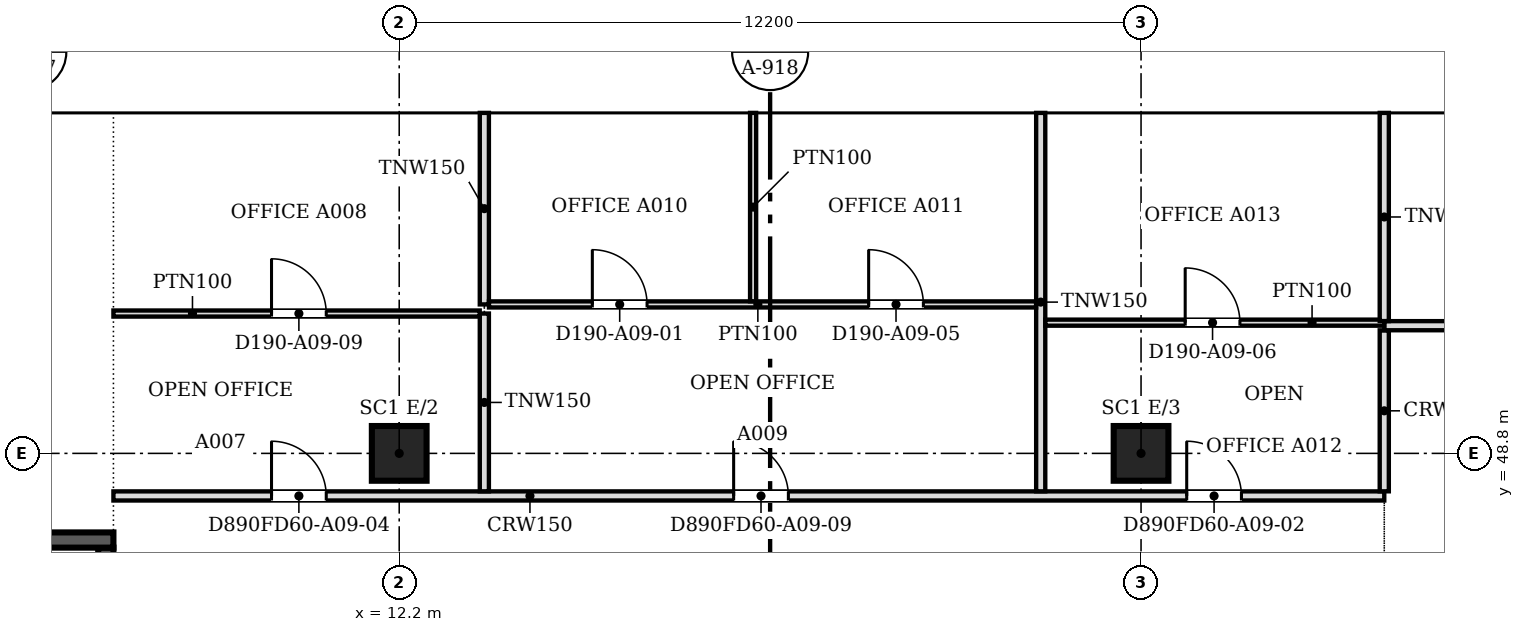
"""IFC4 building model, lengths in metres.
Left out: names, types, materials, properties, quantities, classifications, styles, units other than length and angle.
Written with IfcOpenShell. Run it as: python <this file> out.ifc"""

import sys

from ifc_helpers import new_model, si_unit, direction, frame, frame_2d, origin, origin_2d, place, context, subcontext, project, spatial, polyline, rectangle, outline, extrude, faceted_brep, source, transform, mapped, element, fill, save


model = new_model("IFC4")
c1 = context("Model", 3, precision=1e-05, world=origin(), true_north=direction((0.0, 1.0)))
c2 = subcontext(c1, "Body", "Model", "MODEL_VIEW")
j1 = project(units=[si_unit("LENGTHUNIT", "METRE"), si_unit("PLANEANGLEUNIT", "RADIAN")], contexts=[c1])
p1 = place(None, origin())
s1 = spatial("IfcSite", under=j1, at=p1, CompositionType="ELEMENT")
p2 = place(p1, origin())
s2 = spatial("IfcBuilding", under=s1, at=p2, CompositionType="ELEMENT")
p3 = place(p2, frame((0.0, 0.0, 102.8)))
s3 = spatial("IfcBuildingStorey", under=s2, at=p3, CompositionType="ELEMENT", Elevation=102.8)
for number, where, z_axis, x_axis in (
    (1, (12.2, 48.8, 0.0), (0.0, 0.0, 1.0), (1.0, 0.0, 0.0)),
    (2, (24.4, 48.8, 0.0), (0.0, 0.0, 1.0), (1.0, 0.0, 0.0)),
):
    element("IfcColumn", number, at=place(p3, frame(where, z_axis=z_axis, x_axis=x_axis)), inside=s3, PredefinedType="COLUMN", context=c2, shape_type="SweptSolid", body=[
        extrude(rectangle(XDim=0.9, YDim=0.9, at=origin_2d()), origin(), (0.0, 0.0, 1.0), 3.55),
    ])
m1 = source(origin(), c2, "Body", "SweptSolid", [
    extrude(outline(polyline([(3.05, 0.0), (6.1, 3.8), (3.05, 7.6), (0.0, 3.8), (3.05, 0.0)])), frame((0.0, 0.25, 0.0), z_axis=(0.0, -1.0, 0.0), x_axis=(1.0, 0.0, 0.0)), (0.0, 0.0, 1.0), 0.5),
])
p4 = place(p3, frame((30.5, 54.65, -3.8), z_axis=(0.0, 0.0, 1.0), x_axis=(-1.0, 0.0, 0.0)))
e3 = element("IfcWall", 3, at=p4, inside=s3, PredefinedType="SOLIDWALL", context=c2, shape_type="MappedRepresentation", body=[
    mapped(m1, transform((0.0, 0.0, 0.0), scale=1.0)),
])
m2 = source(origin(), c2, "Body", "SweptSolid", [
    extrude(outline(polyline([(3.05, 0.399), (5.78, 3.8), (3.05, 7.201), (0.321, 3.8), (3.05, 0.399)])), frame((0.0, 0.26, 0.0), z_axis=(0.0, -1.0, 0.0), x_axis=(1.0, 0.0, 0.0)), (0.0, 0.0, 1.0), 0.52),
])
p5 = place(p4, origin())
e4 = element("IfcOpeningElement", 4, at=p5, cuts=e3, PredefinedType="OPENING", context=c2, shape_type="MappedRepresentation", body=[
    mapped(m2, transform((0.0, 0.0, 0.0), scale=1.0)),
])
m3 = source(origin(), c2, "Body", "Brep", [
    faceted_brep([(3.05, -0.25, 0.0), (6.1, -0.25, 3.8), (6.1, -0.25, 3.8), (3.05, -0.25, 7.6), (0.0, -0.25, 3.8), (0.0, 0.25, 3.8), (3.05, 0.25, 7.6), (6.1, 0.25, 3.8), (6.1, 0.25, 3.8), (3.05, 0.25, 0.0)], [[[0, 1, 2, 3, 4]], [[5, 6, 7, 8, 9]], [[9, 8, 1, 0]], [[7, 6, 3, 2]], [[6, 5, 4, 3]], [[5, 9, 0, 4]], [[1, 8, 7, 2]]]),
])
p6 = place(p3, frame((24.4, 54.65, -3.8), z_axis=(0.0, 0.0, 1.0), x_axis=(-1.0, 0.0, 0.0)))
e5 = element("IfcWall", 5, at=p6, inside=s3, PredefinedType="SOLIDWALL", context=c2, shape_type="MappedRepresentation", body=[
    mapped(m3, transform((0.0, 0.0, 0.0), scale=1.0)),
])
p7 = place(p6, origin())
e6 = element("IfcOpeningElement", 6, at=p7, cuts=e5, PredefinedType="OPENING", context=c2, shape_type="MappedRepresentation", body=[
    mapped(m2, transform((0.0, 0.0, 0.0), scale=1.0)),
])
p8 = place(p3, frame((18.3, 54.65, -3.8), z_axis=(0.0, 0.0, 1.0), x_axis=(-1.0, 0.0, 0.0)))
e7 = element("IfcWall", 7, at=p8, inside=s3, PredefinedType="SOLIDWALL", context=c2, shape_type="MappedRepresentation", body=[
    mapped(m1, transform((0.0, 0.0, 0.0), scale=1.0)),
])
p9 = place(p8, origin())
e8 = element("IfcOpeningElement", 8, at=p9, cuts=e7, PredefinedType="OPENING", context=c2, shape_type="MappedRepresentation", body=[
    mapped(m2, transform((0.0, 0.0, 0.0), scale=1.0)),
])
m4 = source(origin(), c2, "Body", "Brep", [
    faceted_brep([(3.05, -0.25, 0.0), (6.053, -0.25, 3.8), (3.05, -0.25, 7.6), (0.0, -0.25, 3.8), (0.0, 0.25, 3.8), (3.05, 0.25, 7.6), (6.007, 0.25, 3.859), (6.007, 0.25, 3.741), (3.05, 0.25, 0.0), (6.053, 0.0, 3.8)], [[[0, 1, 2, 3]], [[4, 5, 6, 7, 8]], [[8, 7, 9, 1, 0]], [[6, 5, 2, 1, 9]], [[5, 4, 3, 2]], [[4, 8, 0, 3]], [[9, 7, 6]]]),
])
p10 = place(p3, frame((12.2, 54.65, -3.8), z_axis=(0.0, 0.0, 1.0), x_axis=(-1.0, 0.0, 0.0)))
e9 = element("IfcWall", 9, at=p10, inside=s3, PredefinedType="SOLIDWALL", context=c2, shape_type="MappedRepresentation", body=[
    mapped(m4, transform((0.0, 0.0, 0.0), scale=1.0)),
])
m5 = source(origin(), c2, "Body", "SweptSolid", [
    extrude(outline(polyline([(3.049, 0.401), (5.735, 3.8), (3.049, 7.199), (0.321, 3.8), (3.049, 0.401)])), frame((0.0, 0.26, 0.0), z_axis=(0.0, -1.0, 0.0), x_axis=(1.0, 0.0, 0.0)), (0.0, 0.0, 1.0), 0.52),
])
p11 = place(p10, origin())
e10 = element("IfcOpeningElement", 10, at=p11, cuts=e9, PredefinedType="OPENING", context=c2, shape_type="MappedRepresentation", body=[
    mapped(m5, transform((0.0, 0.0, 0.0), scale=1.0)),
])
m6 = source(origin(), c2, "Body", "SweptSolid", [
    extrude(outline(polyline([(3.05, 0.0), (6.1, 3.8), (0.0, 3.8), (3.05, 0.0)])), frame((0.0, 0.25, 0.0), z_axis=(0.0, -1.0, 0.0), x_axis=(1.0, 0.0, 0.0)), (0.0, 0.0, 1.0), 0.5),
])
p12 = place(p3, frame((33.55, 54.65, 0.0), z_axis=(0.0, 0.0, 1.0), x_axis=(-1.0, 0.0, 0.0)))
e11 = element("IfcWall", 11, at=p12, inside=s3, PredefinedType="SOLIDWALL", context=c2, shape_type="MappedRepresentation", body=[
    mapped(m6, transform((0.0, 0.0, 0.0), scale=1.0)),
])
m7 = source(origin(), c2, "Body", "SweptSolid", [
    extrude(outline(polyline([(3.05, 0.399), (5.579, 3.55), (0.521, 3.55), (3.05, 0.399)])), frame((0.0, 0.26, 0.0), z_axis=(0.0, -1.0, 0.0), x_axis=(1.0, 0.0, 0.0)), (0.0, 0.0, 1.0), 0.52),
])
p13 = place(p12, origin())
e12 = element("IfcOpeningElement", 12, at=p13, cuts=e11, PredefinedType="OPENING", context=c2, shape_type="MappedRepresentation", body=[
    mapped(m7, transform((0.0, 0.0, 0.0), scale=1.0)),
])
m8 = source(origin(), c2, "Body", "Brep", [
    faceted_brep([(3.05, -0.25, 0.0), (6.1, -0.25, 3.8), (6.1, -0.25, 3.8), (0.0, -0.25, 3.8), (0.0, 0.25, 3.8), (6.1, 0.25, 3.8), (6.1, 0.25, 3.8), (3.05, 0.25, 0.0)], [[[0, 1, 2, 3]], [[4, 5, 6, 7]], [[7, 6, 1, 0]], [[5, 4, 3, 2]], [[4, 7, 0, 3]], [[1, 6, 5, 2]]]),
])
p14 = place(p3, frame((27.45, 54.65, 0.0), z_axis=(0.0, 0.0, 1.0), x_axis=(-1.0, 0.0, 0.0)))
e13 = element("IfcWall", 13, at=p14, inside=s3, PredefinedType="SOLIDWALL", context=c2, shape_type="MappedRepresentation", body=[
    mapped(m8, transform((0.0, 0.0, 0.0), scale=1.0)),
])
p15 = place(p14, origin())
e14 = element("IfcOpeningElement", 14, at=p15, cuts=e13, PredefinedType="OPENING", context=c2, shape_type="MappedRepresentation", body=[
    mapped(m7, transform((0.0, 0.0, 0.0), scale=1.0)),
])
p16 = place(p3, frame((21.35, 54.65, 0.0), z_axis=(0.0, 0.0, 1.0), x_axis=(-1.0, 0.0, 0.0)))
e15 = element("IfcWall", 15, at=p16, inside=s3, PredefinedType="SOLIDWALL", context=c2, shape_type="MappedRepresentation", body=[
    mapped(m6, transform((0.0, 0.0, 0.0), scale=1.0)),
])
p17 = place(p16, origin())
e16 = element("IfcOpeningElement", 16, at=p17, cuts=e15, PredefinedType="OPENING", context=c2, shape_type="MappedRepresentation", body=[
    mapped(m7, transform((0.0, 0.0, 0.0), scale=1.0)),
])
p18 = place(p3, frame((15.25, 54.65, 0.0), z_axis=(0.0, 0.0, 1.0), x_axis=(-1.0, 0.0, 0.0)))
e17 = element("IfcWall", 17, at=p18, inside=s3, PredefinedType="SOLIDWALL", context=c2, shape_type="MappedRepresentation", body=[
    mapped(m6, transform((0.0, 0.0, 0.0), scale=1.0)),
])
p19 = place(p18, origin())
e18 = element("IfcOpeningElement", 18, at=p19, cuts=e17, PredefinedType="OPENING", context=c2, shape_type="MappedRepresentation", body=[
    mapped(m7, transform((0.0, 0.0, 0.0), scale=1.0)),
])
m9 = source(origin(), c2, "Body", "Brep", [
    faceted_brep([(3.003, -0.25, 0.0), (3.05, -0.25, 0.06), (3.05, -0.25, 3.8), (0.0, -0.25, 3.8), (0.0, 0.25, 3.8), (2.957, 0.25, 3.8), (2.957, 0.25, 0.059), (3.003, 0.0, 0.0)], [[[0, 1, 2, 3]], [[4, 5, 6]], [[1, 0, 7]], [[5, 4, 3, 2]], [[4, 6, 7, 0, 3]], [[1, 7, 6, 5, 2]]]),
])
p20 = place(p3, frame((9.15, 54.65, 0.0), z_axis=(0.0, 0.0, 1.0), x_axis=(-1.0, 0.0, 0.0)))
e19 = element("IfcWall", 19, at=p20, inside=s3, PredefinedType="SOLIDWALL", context=c2, shape_type="MappedRepresentation", body=[
    mapped(m9, transform((0.0, 0.0, 0.0), scale=1.0)),
])
m10 = source(origin(), c2, "Body", "SweptSolid", [
    extrude(outline(polyline([(2.803, 3.55), (0.516, 3.55), (2.803, 0.656), (2.803, 3.55)])), frame((0.0, 0.26, 0.0), z_axis=(0.0, -1.0, 0.0), x_axis=(1.0, 0.0, 0.0)), (0.0, 0.0, 1.0), 0.52),
])
p21 = place(p20, origin())
e20 = element("IfcOpeningElement", 20, at=p21, cuts=e19, PredefinedType="OPENING", context=c2, shape_type="MappedRepresentation", body=[
    mapped(m10, transform((0.0, 0.0, 0.0), scale=1.0)),
])
p22 = place(p3, frame((3.6, 47.375, 0.0), z_axis=(0.0, 0.0, 1.0), x_axis=(1.0, 0.0, 0.0)))
e21 = element("IfcWall", 21, at=p22, inside=s3, PredefinedType="SOLIDWALL", context=c2, shape_type="SweptSolid", body=[
    extrude(rectangle(XDim=3.9, YDim=0.25, at=frame_2d((1.95, 0.0))), origin(), (0.0, 0.0, 1.0), 3.8),
])
p23 = place(p3, frame((7.375, 47.25, 0.0), z_axis=(0.0, 0.0, 1.0), x_axis=(0.0, -1.0, 0.0)))
e22 = element("IfcWall", 22, at=p23, inside=s3, PredefinedType="SOLIDWALL", context=c2, shape_type="SweptSolid", body=[
    extrude(rectangle(XDim=8.0, YDim=0.25, at=frame_2d((4.0, 0.0))), origin(), (0.0, 0.0, 1.0), 3.8),
])
m11 = source(origin(), c2, "Body", "SweptSolid", [
    extrude(rectangle(XDim=1.2, YDim=2.1, at=frame_2d((0.6, 1.05))), frame((0.0, 0.135, 0.0), z_axis=(0.0, -1.0, 0.0), x_axis=(1.0, 0.0, 0.0)), (0.0, 0.0, 1.0), 0.27),
])
p24 = place(p23, frame((0.15, 0.0, 0.0)))
e23 = element("IfcOpeningElement", 23, at=p24, cuts=e22, PredefinedType="OPENING", context=c2, shape_type="MappedRepresentation", body=[
    mapped(m11, transform((0.0, 0.0, 0.0), scale=1.0)),
])
p25 = place(p3, frame((7.5, 48.1, 0.0), z_axis=(0.0, 0.0, 1.0), x_axis=(1.0, 0.0, 0.0)))
e24 = element("IfcWall", 24, at=p25, inside=s3, PredefinedType="PARTITIONING", context=c2, shape_type="SweptSolid", body=[
    extrude(rectangle(XDim=20.9, YDim=0.15, at=frame_2d((10.45, 0.0))), origin(), (0.0, 0.0, 1.0), 2.715),
])
m12 = source(origin(), c2, "Body", "SweptSolid", [
    extrude(rectangle(XDim=0.9, YDim=2.1, at=frame_2d((0.45, 1.05))), frame((0.0, 0.085, 0.0), z_axis=(0.0, -1.0, 0.0), x_axis=(1.0, 0.0, 0.0)), (0.0, 0.0, 1.0), 0.17),
])
p26 = place(p25, frame((17.651, 0.0, 0.0)))
e25 = element("IfcOpeningElement", 25, at=p26, cuts=e24, PredefinedType="OPENING", context=c2, shape_type="MappedRepresentation", body=[
    mapped(m12, transform((0.0, 0.0, 0.0), scale=1.0)),
])
p27 = place(p25, frame((2.6, 0.0, 0.0)))
e26 = element("IfcOpeningElement", 26, at=p27, cuts=e24, PredefinedType="OPENING", context=c2, shape_type="MappedRepresentation", body=[
    mapped(m12, transform((0.0, 0.0, 0.0), scale=1.0)),
])
p28 = place(p25, frame((10.2, 0.0, 0.0)))
e27 = element("IfcOpeningElement", 27, at=p28, cuts=e24, PredefinedType="OPENING", context=c2, shape_type="MappedRepresentation", body=[
    mapped(m12, transform((0.0, 0.0, 0.0), scale=1.0)),
])
p29 = place(p3, frame((13.6, 48.176, 0.0), z_axis=(0.0, 0.0, 1.0), x_axis=(0.0, 1.0, 0.0)))
e28 = element("IfcWall", 28, at=p29, inside=s3, PredefinedType="PARTITIONING", context=c2, shape_type="SweptSolid", body=[
    extrude(rectangle(XDim=2.924, YDim=0.15, at=frame_2d((1.462, 0.0))), origin(), (0.0, 0.0, 1.0), 2.715),
])
p30 = place(p3, frame((22.75, 48.176, 0.0), z_axis=(0.0, 0.0, 1.0), x_axis=(0.0, 1.0, 0.0)))
e29 = element("IfcWall", 29, at=p30, inside=s3, PredefinedType="PARTITIONING", context=c2, shape_type="SweptSolid", body=[
    extrude(rectangle(XDim=6.224, YDim=0.15, at=frame_2d((3.112, 0.0))), origin(), (0.0, 0.0, 1.0), 2.715),
])
p31 = place(p3, frame((28.4, 48.176, 0.0), z_axis=(0.0, 0.0, 1.0), x_axis=(0.0, 1.0, 0.0)))
e30 = element("IfcWall", 30, at=p31, inside=s3, PredefinedType="PARTITIONING", context=c2, shape_type="SweptSolid", body=[
    extrude(rectangle(XDim=2.648, YDim=0.15, at=frame_2d((1.324, 0.0))), origin(), (0.0, 0.0, 1.0), 2.715),
])
p32 = place(p3, frame((28.4, 50.9, 0.0), z_axis=(0.0, 0.0, 1.0), x_axis=(1.0, 0.0, 0.0)))
e31 = element("IfcWall", 31, at=p32, inside=s3, PredefinedType="PARTITIONING", context=c2, shape_type="SweptSolid", body=[
    extrude(rectangle(XDim=31.254, YDim=0.15, at=frame_2d((15.627, 0.0))), origin(), (0.0, 0.0, 1.0), 2.715),
])
p33 = place(p32, frame((4.1, 0.0, 0.0)))
e32 = element("IfcOpeningElement", 32, at=p33, cuts=e31, PredefinedType="OPENING", context=c2, shape_type="MappedRepresentation", body=[
    mapped(m12, transform((0.0, 0.0, 0.0), scale=1.0)),
])
p34 = place(p32, frame((13.25, 0.0, 0.0)))
e33 = element("IfcOpeningElement", 33, at=p34, cuts=e31, PredefinedType="OPENING", context=c2, shape_type="MappedRepresentation", body=[
    mapped(m12, transform((0.0, 0.0, 0.0), scale=1.0)),
])
p35 = place(p32, frame((24.3, 0.0, 0.0)))
e34 = element("IfcOpeningElement", 34, at=p35, cuts=e31, PredefinedType="OPENING", context=c2, shape_type="MappedRepresentation", body=[
    mapped(m12, transform((0.0, 0.0, 0.0), scale=1.0)),
])
p36 = place(p3, frame((22.826, 50.95, 0.0), z_axis=(0.0, 0.0, 1.0), x_axis=(1.0, 0.0, 0.0)))
e35 = element("IfcWall", 35, at=p36, inside=s3, PredefinedType="PARTITIONING", context=c2, shape_type="SweptSolid", body=[
    extrude(rectangle(XDim=5.573, YDim=0.1, at=frame_2d((2.787, 0.0))), origin(), (0.0, 0.0, 1.0), 2.715),
])
m13 = source(origin(), c2, "Body", "SweptSolid", [
    extrude(rectangle(XDim=0.9, YDim=2.1, at=frame_2d((0.45, 1.05))), frame((0.0, 0.06, 0.0), z_axis=(0.0, -1.0, 0.0), x_axis=(1.0, 0.0, 0.0)), (0.0, 0.0, 1.0), 0.12),
])
p37 = place(p36, frame((2.3, 0.0, 0.0)))
e36 = element("IfcOpeningElement", 36, at=p37, cuts=e35, PredefinedType="OPENING", context=c2, shape_type="MappedRepresentation", body=[
    mapped(m13, transform((0.0, 0.0, 0.0), scale=1.0)),
])
p38 = place(p3, frame((28.4, 50.976, 0.0), z_axis=(0.0, 0.0, 1.0), x_axis=(0.0, 1.0, 0.0)))
e37 = element("IfcWall", 37, at=p38, inside=s3, PredefinedType="PARTITIONING", context=c2, shape_type="SweptSolid", body=[
    extrude(rectangle(XDim=3.424, YDim=0.15, at=frame_2d((1.712, 0.0))), origin(), (0.0, 0.0, 1.0), 2.715),
])
p39 = place(p3, frame((7.5, 51.1, 0.0), z_axis=(0.0, 0.0, 1.0), x_axis=(1.0, 0.0, 0.0)))
e38 = element("IfcWall", 38, at=p39, inside=s3, PredefinedType="PARTITIONING", context=c2, shape_type="SweptSolid", body=[
    extrude(rectangle(XDim=6.024, YDim=0.1, at=frame_2d((3.012, 0.0))), origin(), (0.0, 0.0, 1.0), 2.715),
])
p40 = place(p39, frame((2.6, 0.0, 0.0)))
e39 = element("IfcOpeningElement", 39, at=p40, cuts=e38, PredefinedType="OPENING", context=c2, shape_type="MappedRepresentation", body=[
    mapped(m13, transform((0.0, 0.0, 0.0), scale=1.0)),
])
p41 = place(p3, frame((13.6, 51.25, 0.0), z_axis=(0.0, 0.0, 1.0), x_axis=(0.0, 1.0, 0.0)))
e40 = element("IfcWall", 40, at=p41, inside=s3, PredefinedType="PARTITIONING", context=c2, shape_type="SweptSolid", body=[
    extrude(rectangle(XDim=3.15, YDim=0.15, at=frame_2d((1.575, 0.0))), origin(), (0.0, 0.0, 1.0), 2.715),
])
p42 = place(p3, frame((13.676, 51.25, 0.0), z_axis=(0.0, 0.0, 1.0), x_axis=(1.0, 0.0, 0.0)))
e41 = element("IfcWall", 41, at=p42, inside=s3, PredefinedType="PARTITIONING", context=c2, shape_type="SweptSolid", body=[
    extrude(rectangle(XDim=8.998, YDim=0.1, at=frame_2d((4.499, 0.0))), origin(), (0.0, 0.0, 1.0), 2.715),
])
p43 = place(p42, frame((1.7, 0.0, 0.0)))
e42 = element("IfcOpeningElement", 42, at=p43, cuts=e41, PredefinedType="OPENING", context=c2, shape_type="MappedRepresentation", body=[
    mapped(m13, transform((0.0, 0.0, 0.0), scale=1.0)),
])
p44 = place(p42, frame((6.244, 0.0, 0.0)))
e43 = element("IfcOpeningElement", 43, at=p44, cuts=e41, PredefinedType="OPENING", context=c2, shape_type="MappedRepresentation", body=[
    mapped(m13, transform((0.0, 0.0, 0.0), scale=1.0)),
])
p45 = place(p3, frame((18.02, 51.301, 0.0), z_axis=(0.0, 0.0, 1.0), x_axis=(0.0, 1.0, 0.0)))
e44 = element("IfcWall", 44, at=p45, inside=s3, PredefinedType="PARTITIONING", context=c2, shape_type="SweptSolid", body=[
    extrude(rectangle(XDim=3.099, YDim=0.1, at=frame_2d((1.549, 0.0))), origin(), (0.0, 0.0, 1.0), 2.715),
])
m14 = source(origin(), c2, "Body", "SweptSolid", [
    extrude(rectangle(XDim=0.9, YDim=2.1, at=frame_2d((0.45, 1.05))), frame((0.0, 0.025, 0.0), z_axis=(0.0, -1.0, 0.0), x_axis=(1.0, 0.0, 0.0)), (0.0, 0.0, 1.0), 0.05),
])
p46 = place(p43, origin())
e45 = element("IfcDoor", 45, at=p46, inside=s3, OperationType="SINGLE_SWING_LEFT", PredefinedType="DOOR", context=c2, shape_type="MappedRepresentation", body=[
    mapped(m14, transform((0.0, 0.0, 0.0), scale=1.0)),
])
fill(e42, e45)
p47 = place(p44, origin())
e46 = element("IfcDoor", 46, at=p47, inside=s3, OperationType="SINGLE_SWING_LEFT", PredefinedType="DOOR", context=c2, shape_type="MappedRepresentation", body=[
    mapped(m14, transform((0.0, 0.0, 0.0), scale=1.0)),
])
fill(e43, e46)
p48 = place(p37, origin())
e47 = element("IfcDoor", 47, at=p48, inside=s3, OperationType="SINGLE_SWING_LEFT", PredefinedType="DOOR", context=c2, shape_type="MappedRepresentation", body=[
    mapped(m14, transform((0.0, 0.0, 0.0), scale=1.0)),
])
fill(e36, e47)
p49 = place(p26, origin())
e48 = element("IfcDoor", 48, at=p49, inside=s3, OperationType="SINGLE_SWING_LEFT", PredefinedType="DOOR", context=c2, shape_type="MappedRepresentation", body=[
    mapped(m14, transform((0.0, 0.0, 0.0), scale=1.0)),
])
fill(e25, e48)
p50 = place(p40, origin())
e49 = element("IfcDoor", 49, at=p50, inside=s3, OperationType="SINGLE_SWING_LEFT", PredefinedType="DOOR", context=c2, shape_type="MappedRepresentation", body=[
    mapped(m14, transform((0.0, 0.0, 0.0), scale=1.0)),
])
fill(e39, e49)
p51 = place(p27, origin())
e50 = element("IfcDoor", 50, at=p51, inside=s3, OperationType="SINGLE_SWING_LEFT", PredefinedType="DOOR", context=c2, shape_type="MappedRepresentation", body=[
    mapped(m14, transform((0.0, 0.0, 0.0), scale=1.0)),
])
fill(e26, e50)
p52 = place(p28, origin())
e51 = element("IfcDoor", 51, at=p52, inside=s3, OperationType="SINGLE_SWING_LEFT", PredefinedType="DOOR", context=c2, shape_type="MappedRepresentation", body=[
    mapped(m14, transform((0.0, 0.0, 0.0), scale=1.0)),
])
fill(e27, e51)
save(model, sys.argv[1])
